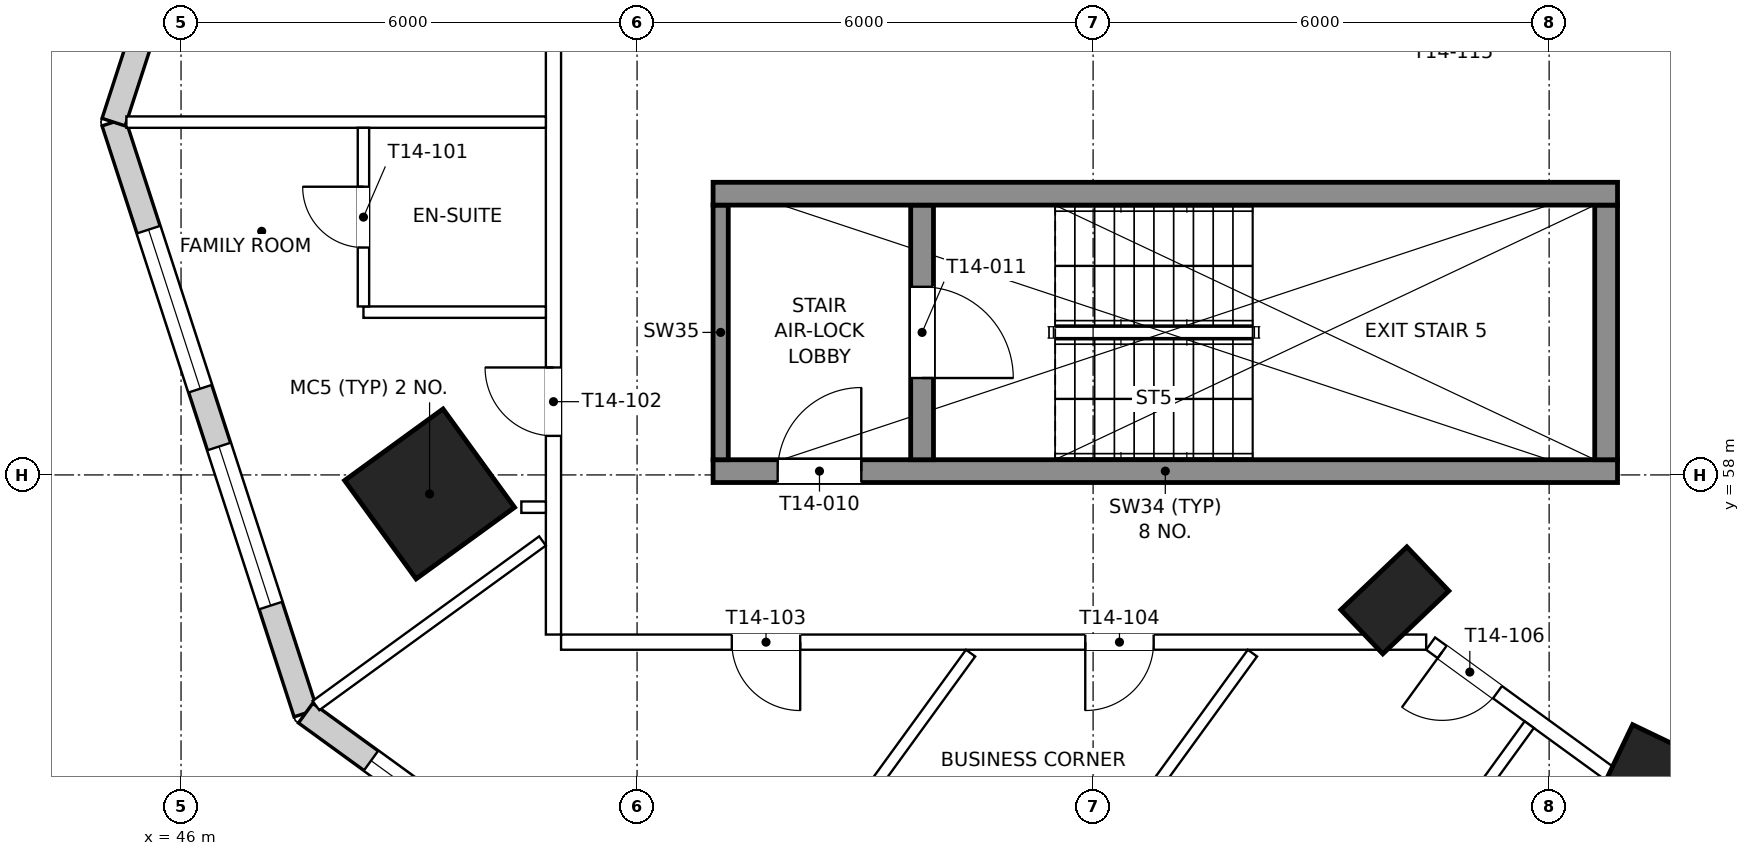
"""IFC4 building model, lengths in metres.
Left out: names, types, materials, properties, quantities, classifications, styles, units other than length and angle.
Written with IfcOpenShell. Run it as: python <this file> out.ifc"""

import sys

from ifc_helpers import new_model, si_unit, direction, frame, frame_2d, origin, origin_2d, place, context, subcontext, project, spatial, rectangle, extrude, element, fill, save


model = new_model("IFC4")
c1 = context("Model", 3, precision=1e-05, world=origin(), true_north=direction((0.0, 1.0)))
c2 = subcontext(c1, "Body", "Model", "MODEL_VIEW")
j1 = project(units=[si_unit("LENGTHUNIT", "METRE"), si_unit("PLANEANGLEUNIT", "RADIAN")], contexts=[c1])
p1 = place(None, origin())
s1 = spatial("IfcSite", under=j1, at=p1, CompositionType="ELEMENT")
p2 = place(p1, origin())
s2 = spatial("IfcBuilding", under=s1, at=p2, CompositionType="ELEMENT")
p3 = place(p2, frame((0.0, 0.0, 204.3)))
s3 = spatial("IfcBuildingStorey", under=s2, at=p3, CompositionType="ELEMENT", Elevation=204.3)
p4 = place(p3, frame((49.27, 57.75, 0.0), z_axis=(0.0, 0.0, 1.0), x_axis=(-0.809016994375, -0.587785252292, 0.0)))
e1 = element("IfcColumn", 1, at=p4, inside=s3, PredefinedType="COLUMN", context=c2, shape_type="SweptSolid", body=[
    extrude(rectangle(XDim=1.6, YDim=1.6, at=origin_2d()), origin(), (0.0, 0.0, 1.0), 3.9),
])
for number, where, z_axis, x_axis in (
    (2, (61.97, 56.35, 0.0), (0.0, 0.0, 1.0), (-0.69, 0.724, 0.0)),
    (3, (65.2, 54.0, 0.0), (0.0, 0.0, 1.0), (-0.902, 0.432, 0.0)),
):
    element("IfcColumn", number, at=place(p3, frame(where, z_axis=z_axis, x_axis=x_axis)), inside=s3, PredefinedType="COLUMN", context=c2, shape_type="SweptSolid", body=[
        extrude(rectangle(XDim=0.8, YDim=1.2, at=origin_2d()), origin(), (0.0, 0.0, 1.0), 3.9),
    ])
p5 = place(p3, frame((45.113, 62.642, 0.0), z_axis=(0.0, 0.0, 1.0), x_axis=(0.309006387978, -0.951059962457, 0.0)))
e4 = element("IfcWall", 4, at=p5, inside=s3, PredefinedType="SOLIDWALL", context=c2, shape_type="SweptSolid", body=[
    extrude(rectangle(XDim=8.175, YDim=0.32, at=frame_2d((4.087, 0.0))), origin(), (0.0, 0.0, 1.0), 3.6),
])
p6 = place(p5, frame((1.488, 0.0, 0.75)))
e5 = element("IfcOpeningElement", 5, at=p6, cuts=e4, PredefinedType="OPENING", context=c2, shape_type="SweptSolid", body=[
    extrude(rectangle(XDim=2.2, YDim=2.1, at=frame_2d((1.1, 1.05))), frame((0.0, 0.17, 0.0), z_axis=(0.0, -1.0, 0.0), x_axis=(1.0, 0.0, 0.0)), (0.0, 0.0, 1.0), 0.34),
])
p7 = place(p5, frame((4.488, 0.0, 0.75)))
e6 = element("IfcOpeningElement", 6, at=p7, cuts=e4, PredefinedType="OPENING", context=c2, shape_type="SweptSolid", body=[
    extrude(rectangle(XDim=2.2, YDim=2.1, at=frame_2d((1.1, 1.05))), frame((0.0, 0.17, 0.0), z_axis=(0.0, -1.0, 0.0), x_axis=(1.0, 0.0, 0.0)), (0.0, 0.0, 1.0), 0.34),
])
p8 = place(p3, frame((47.639, 54.867, 0.0), z_axis=(0.0, 0.0, 1.0), x_axis=(0.809017634756, -0.587784370883, 0.0)))
e7 = element("IfcWall", 7, at=p8, inside=s3, PredefinedType="SOLIDWALL", context=c2, shape_type="SweptSolid", body=[
    extrude(rectangle(XDim=22.229, YDim=0.32, at=frame_2d((11.114, 0.0))), origin(), (0.0, 0.0, 1.0), 3.6),
])
p9 = place(p8, frame((1.064, 0.0, 0.75)))
e8 = element("IfcOpeningElement", 8, at=p9, cuts=e7, PredefinedType="OPENING", context=c2, shape_type="SweptSolid", body=[
    extrude(rectangle(XDim=2.1, YDim=2.1, at=frame_2d((1.05, 1.05))), frame((0.0, 0.17, 0.0), z_axis=(0.0, -1.0, 0.0), x_axis=(1.0, 0.0, 0.0)), (0.0, 0.0, 1.0), 0.34),
])
p10 = place(p8, frame((4.064, 0.0, 0.75)))
e9 = element("IfcOpeningElement", 9, at=p10, cuts=e7, PredefinedType="OPENING", context=c2, shape_type="SweptSolid", body=[
    extrude(rectangle(XDim=2.1, YDim=2.1, at=frame_2d((1.05, 1.05))), frame((0.0, 0.17, 0.0), z_axis=(0.0, -1.0, 0.0), x_axis=(1.0, 0.0, 0.0)), (0.0, 0.0, 1.0), 0.34),
])
p11 = place(p8, frame((7.064, 0.0, 0.75)))
e10 = element("IfcOpeningElement", 10, at=p11, cuts=e7, PredefinedType="OPENING", context=c2, shape_type="SweptSolid", body=[
    extrude(rectangle(XDim=2.1, YDim=2.1, at=frame_2d((1.05, 1.05))), frame((0.0, 0.17, 0.0), z_axis=(0.0, -1.0, 0.0), x_axis=(1.0, 0.0, 0.0)), (0.0, 0.0, 1.0), 0.34),
])
p12 = place(p8, frame((10.064, 0.0, 0.75)))
e11 = element("IfcOpeningElement", 11, at=p12, cuts=e7, PredefinedType="OPENING", context=c2, shape_type="SweptSolid", body=[
    extrude(rectangle(XDim=2.1, YDim=2.1, at=frame_2d((1.05, 1.05))), frame((0.0, 0.17, 0.0), z_axis=(0.0, -1.0, 0.0), x_axis=(1.0, 0.0, 0.0)), (0.0, 0.0, 1.0), 0.34),
])
p13 = place(p8, frame((13.064, 0.0, 0.75)))
e12 = element("IfcOpeningElement", 12, at=p13, cuts=e7, PredefinedType="OPENING", context=c2, shape_type="SweptSolid", body=[
    extrude(rectangle(XDim=2.1, YDim=2.1, at=frame_2d((1.05, 1.05))), frame((0.0, 0.17, 0.0), z_axis=(0.0, -1.0, 0.0), x_axis=(1.0, 0.0, 0.0)), (0.0, 0.0, 1.0), 0.34),
])
p14 = place(p8, frame((16.064, 0.0, 0.75)))
e13 = element("IfcOpeningElement", 13, at=p14, cuts=e7, PredefinedType="OPENING", context=c2, shape_type="SweptSolid", body=[
    extrude(rectangle(XDim=2.1, YDim=2.1, at=frame_2d((1.05, 1.05))), frame((0.0, 0.17, 0.0), z_axis=(0.0, -1.0, 0.0), x_axis=(1.0, 0.0, 0.0)), (0.0, 0.0, 1.0), 0.34),
])
p15 = place(p8, frame((19.064, 0.0, 0.75)))
e14 = element("IfcOpeningElement", 14, at=p15, cuts=e7, PredefinedType="OPENING", context=c2, shape_type="SweptSolid", body=[
    extrude(rectangle(XDim=2.1, YDim=2.1, at=frame_2d((1.05, 1.05))), frame((0.0, 0.17, 0.0), z_axis=(0.0, -1.0, 0.0), x_axis=(1.0, 0.0, 0.0)), (0.0, 0.0, 1.0), 0.34),
])
p16 = place(p3, frame((51.658, 82.785, 0.0), z_axis=(0.0, 0.0, 1.0), x_axis=(-0.309019087741, -0.951055836117, 0.0)))
e15 = element("IfcWall", 15, at=p16, inside=s3, PredefinedType="SOLIDWALL", context=c2, shape_type="SweptSolid", body=[
    extrude(rectangle(XDim=21.18, YDim=0.32, at=frame_2d((10.59, 0.0))), origin(), (0.0, 0.0, 1.0), 3.6),
])
p17 = place(p16, frame((2.04, 0.0, 0.75)))
e16 = element("IfcOpeningElement", 16, at=p17, cuts=e15, PredefinedType="OPENING", context=c2, shape_type="SweptSolid", body=[
    extrude(rectangle(XDim=2.1, YDim=2.1, at=frame_2d((1.05, 1.05))), frame((0.0, 0.17, 0.0), z_axis=(0.0, -1.0, 0.0), x_axis=(1.0, 0.0, 0.0)), (0.0, 0.0, 1.0), 0.34),
])
p18 = place(p16, frame((5.453, 0.0, 0.9)))
e17 = element("IfcOpeningElement", 17, at=p18, cuts=e15, PredefinedType="OPENING", context=c2, shape_type="SweptSolid", body=[
    extrude(rectangle(XDim=1.6, YDim=1.8, at=frame_2d((0.8, 0.9))), frame((0.0, 0.17, 0.0), z_axis=(0.0, -1.0, 0.0), x_axis=(1.0, 0.0, 0.0)), (0.0, 0.0, 1.0), 0.34),
])
p19 = place(p16, frame((8.04, 0.0, 0.75)))
e18 = element("IfcOpeningElement", 18, at=p19, cuts=e15, PredefinedType="OPENING", context=c2, shape_type="SweptSolid", body=[
    extrude(rectangle(XDim=2.1, YDim=2.1, at=frame_2d((1.05, 1.05))), frame((0.0, 0.17, 0.0), z_axis=(0.0, -1.0, 0.0), x_axis=(1.0, 0.0, 0.0)), (0.0, 0.0, 1.0), 0.34),
])
p20 = place(p16, frame((11.04, 0.0, 0.75)))
e19 = element("IfcOpeningElement", 19, at=p20, cuts=e15, PredefinedType="OPENING", context=c2, shape_type="SweptSolid", body=[
    extrude(rectangle(XDim=2.1, YDim=2.1, at=frame_2d((1.05, 1.05))), frame((0.0, 0.17, 0.0), z_axis=(0.0, -1.0, 0.0), x_axis=(1.0, 0.0, 0.0)), (0.0, 0.0, 1.0), 0.34),
])
p21 = place(p16, frame((13.908, 0.0, 0.75)))
e20 = element("IfcOpeningElement", 20, at=p21, cuts=e15, PredefinedType="OPENING", context=c2, shape_type="SweptSolid", body=[
    extrude(rectangle(XDim=2.1, YDim=2.1, at=frame_2d((1.05, 1.05))), frame((0.0, 0.17, 0.0), z_axis=(0.0, -1.0, 0.0), x_axis=(1.0, 0.0, 0.0)), (0.0, 0.0, 1.0), 0.34),
])
p22 = place(p16, frame((17.04, 0.0, 0.75)))
e21 = element("IfcOpeningElement", 21, at=p22, cuts=e15, PredefinedType="OPENING", context=c2, shape_type="SweptSolid", body=[
    extrude(rectangle(XDim=2.1, YDim=2.1, at=frame_2d((1.05, 1.05))), frame((0.0, 0.17, 0.0), z_axis=(0.0, -1.0, 0.0), x_axis=(1.0, 0.0, 0.0)), (0.0, 0.0, 1.0), 0.34),
])
p23 = place(p3, frame((53.0, 58.05, 0.0), z_axis=(0.0, 0.0, 1.0), x_axis=(1.0, 0.0, 0.0)))
e22 = element("IfcWall", 22, at=p23, inside=s3, PredefinedType="SHEAR", context=c2, shape_type="SweptSolid", body=[
    extrude(rectangle(XDim=11.9, YDim=0.3, at=frame_2d((5.95, 0.0))), origin(), (0.0, 0.0, 1.0), 3.9),
])
p24 = place(p23, frame((0.85, 0.0, 0.0)))
e23 = element("IfcOpeningElement", 23, at=p24, cuts=e22, PredefinedType="OPENING", context=c2, shape_type="SweptSolid", body=[
    extrude(rectangle(XDim=1.1, YDim=2.1, at=frame_2d((0.55, 1.05))), frame((0.0, 0.16, 0.0), z_axis=(0.0, -1.0, 0.0), x_axis=(1.0, 0.0, 0.0)), (0.0, 0.0, 1.0), 0.32),
])
p25 = place(p3, frame((53.1, 58.2, 0.0), z_axis=(0.0, 0.0, 1.0), x_axis=(0.0, 1.0, 0.0)))
e24 = element("IfcWall", 24, at=p25, inside=s3, PredefinedType="SHEAR", context=c2, shape_type="SweptSolid", body=[
    extrude(rectangle(XDim=3.35, YDim=0.2, at=frame_2d((1.675, 0.0))), origin(), (0.0, 0.0, 1.0), 3.9),
])
p26 = place(p3, frame((55.75, 58.2, 0.0), z_axis=(0.0, 0.0, 1.0), x_axis=(0.0, 1.0, 0.0)))
e25 = element("IfcWall", 25, at=p26, inside=s3, PredefinedType="SHEAR", context=c2, shape_type="SweptSolid", body=[
    extrude(rectangle(XDim=3.35, YDim=0.3, at=frame_2d((1.675, 0.0))), origin(), (0.0, 0.0, 1.0), 3.9),
])
p27 = place(p26, frame((1.075, 0.0, 0.0)))
e26 = element("IfcOpeningElement", 26, at=p27, cuts=e25, PredefinedType="OPENING", context=c2, shape_type="SweptSolid", body=[
    extrude(rectangle(XDim=1.2, YDim=2.1, at=frame_2d((0.6, 1.05))), frame((0.0, 0.16, 0.0), z_axis=(0.0, -1.0, 0.0), x_axis=(1.0, 0.0, 0.0)), (0.0, 0.0, 1.0), 0.32),
])
p28 = place(p3, frame((64.75, 58.2, 0.0), z_axis=(0.0, 0.0, 1.0), x_axis=(0.0, 1.0, 0.0)))
e27 = element("IfcWall", 27, at=p28, inside=s3, PredefinedType="SHEAR", context=c2, shape_type="SweptSolid", body=[
    extrude(rectangle(XDim=3.35, YDim=0.3, at=frame_2d((1.675, 0.0))), origin(), (0.0, 0.0, 1.0), 3.9),
])
p29 = place(p3, frame((53.0, 61.7, 0.0), z_axis=(0.0, 0.0, 1.0), x_axis=(1.0, 0.0, 0.0)))
e28 = element("IfcWall", 28, at=p29, inside=s3, PredefinedType="SHEAR", context=c2, shape_type="SweptSolid", body=[
    extrude(rectangle(XDim=11.9, YDim=0.3, at=frame_2d((5.95, 0.0))), origin(), (0.0, 0.0, 1.0), 3.9),
])
p30 = place(p3, frame((68.663, 51.26, 0.0), z_axis=(0.0, 0.0, 1.0), x_axis=(-0.80901190539, 0.587792256616, 0.0)))
e29 = element("IfcWall", 29, at=p30, inside=s3, PredefinedType="PARTITIONING", context=c2, shape_type="SweptSolid", body=[
    extrude(rectangle(XDim=7.691, YDim=0.2, at=frame_2d((3.846, 0.0))), origin(), (0.0, 0.0, 1.0), 3.05),
])
p31 = place(p30, frame((6.604, 0.0, 0.0)))
e30 = element("IfcOpeningElement", 30, at=p31, cuts=e29, PredefinedType="OPENING", context=c2, shape_type="SweptSolid", body=[
    extrude(rectangle(XDim=0.9, YDim=2.1, at=frame_2d((0.45, 1.05))), frame((0.0, 0.11, 0.0), z_axis=(0.0, -1.0, 0.0), x_axis=(1.0, 0.0, 0.0)), (0.0, 0.0, 1.0), 0.22),
])
p32 = place(p30, frame((1.291, 0.0, 0.0)))
e31 = element("IfcOpeningElement", 31, at=p32, cuts=e29, PredefinedType="OPENING", context=c2, shape_type="SweptSolid", body=[
    extrude(rectangle(XDim=0.9, YDim=2.1, at=frame_2d((0.45, 1.05))), frame((0.0, 0.11, 0.0), z_axis=(0.0, -1.0, 0.0), x_axis=(1.0, 0.0, 0.0)), (0.0, 0.0, 1.0), 0.22),
])
p33 = place(p3, frame((62.382, 55.8, 0.0), z_axis=(0.0, 0.0, 1.0), x_axis=(-1.0, 0.0, 0.0)))
e32 = element("IfcWall", 32, at=p33, inside=s3, PredefinedType="PARTITIONING", context=c2, shape_type="SweptSolid", body=[
    extrude(rectangle(XDim=11.382, YDim=0.2, at=frame_2d((5.691, 0.0))), origin(), (0.0, 0.0, 1.0), 3.15),
])
p34 = place(p33, frame((8.236, 0.0, 0.0)))
e33 = element("IfcOpeningElement", 33, at=p34, cuts=e32, PredefinedType="OPENING", context=c2, shape_type="SweptSolid", body=[
    extrude(rectangle(XDim=0.9, YDim=2.1, at=frame_2d((0.45, 1.05))), frame((0.0, 0.11, 0.0), z_axis=(0.0, -1.0, 0.0), x_axis=(1.0, 0.0, 0.0)), (0.0, 0.0, 1.0), 0.22),
])
p35 = place(p33, frame((3.585, 0.0, 0.0)))
e34 = element("IfcOpeningElement", 34, at=p35, cuts=e32, PredefinedType="OPENING", context=c2, shape_type="SweptSolid", body=[
    extrude(rectangle(XDim=0.9, YDim=2.1, at=frame_2d((0.45, 1.05))), frame((0.0, 0.11, 0.0), z_axis=(0.0, -1.0, 0.0), x_axis=(1.0, 0.0, 0.0)), (0.0, 0.0, 1.0), 0.22),
])
p36 = place(p3, frame((50.9, 55.9, 0.0), z_axis=(0.0, 0.0, 1.0), x_axis=(0.0, 1.0, 0.0)))
e35 = element("IfcWall", 35, at=p36, inside=s3, PredefinedType="PARTITIONING", context=c2, shape_type="SweptSolid", body=[
    extrude(rectangle(XDim=7.95, YDim=0.2, at=frame_2d((3.975, 0.0))), origin(), (0.0, 0.0, 1.0), 3.15),
])
p37 = place(p36, frame((2.614, 0.0, 0.0)))
e36 = element("IfcOpeningElement", 36, at=p37, cuts=e35, PredefinedType="OPENING", context=c2, shape_type="SweptSolid", body=[
    extrude(rectangle(XDim=0.9, YDim=2.1, at=frame_2d((0.45, 1.05))), frame((0.0, 0.11, 0.0), z_axis=(0.0, -1.0, 0.0), x_axis=(1.0, 0.0, 0.0)), (0.0, 0.0, 1.0), 0.22),
])
p38 = place(p3, frame((45.281, 62.642, 0.0), z_axis=(0.0, 0.0, 1.0), x_axis=(1.0, 0.0, 0.0)))
e37 = element("IfcWall", 37, at=p38, inside=s3, PredefinedType="PARTITIONING", context=c2, shape_type="SweptSolid", body=[
    extrude(rectangle(XDim=5.519, YDim=0.15, at=frame_2d((2.76, 0.0))), origin(), (0.0, 0.0, 1.0), 3.15),
])
p39 = place(p3, frame((47.775, 54.966, 0.0), z_axis=(0.0, 0.0, 1.0), x_axis=(0.809028266422, 0.587769737338, 0.0)))
e38 = element("IfcWall", 38, at=p39, inside=s3, PredefinedType="PARTITIONING", context=c2, shape_type="SweptSolid", body=[
    extrude(rectangle(XDim=3.684, YDim=0.15, at=frame_2d((1.842, 0.0))), origin(), (0.0, 0.0, 1.0), 3.15),
])
p40 = place(p3, frame((50.8, 60.142, 0.0), z_axis=(0.0, 0.0, 1.0), x_axis=(-1.0, 0.0, 0.0)))
e39 = element("IfcWall", 39, at=p40, inside=s3, PredefinedType="PARTITIONING", context=c2, shape_type="SweptSolid", body=[
    extrude(rectangle(XDim=2.4, YDim=0.15, at=frame_2d((1.2, 0.0))), origin(), (0.0, 0.0, 1.0), 3.15),
])
p41 = place(p3, frame((48.4, 62.567, 0.0), z_axis=(0.0, 0.0, 1.0), x_axis=(0.0, -1.0, 0.0)))
e40 = element("IfcWall", 40, at=p41, inside=s3, PredefinedType="PARTITIONING", context=c2, shape_type="SweptSolid", body=[
    extrude(rectangle(XDim=2.35, YDim=0.15, at=frame_2d((1.175, 0.0))), origin(), (0.0, 0.0, 1.0), 3.15),
])
p42 = place(p41, frame((0.775, 0.0, 0.0)))
e41 = element("IfcOpeningElement", 41, at=p42, cuts=e40, PredefinedType="OPENING", context=c2, shape_type="SweptSolid", body=[
    extrude(rectangle(XDim=0.8, YDim=2.1, at=frame_2d((0.4, 1.05))), frame((0.0, 0.085, 0.0), z_axis=(0.0, -1.0, 0.0), x_axis=(1.0, 0.0, 0.0)), (0.0, 0.0, 1.0), 0.17),
])
p43 = place(p3, frame((53.084, 51.108, 0.0), z_axis=(0.0, 0.0, 1.0), x_axis=(0.587804932614, 0.809002695419, 0.0)))
e42 = element("IfcWall", 42, at=p43, inside=s3, PredefinedType="PARTITIONING", context=c2, shape_type="SweptSolid", body=[
    extrude(rectangle(XDim=5.621, YDim=0.15, at=frame_2d((2.811, 0.0))), origin(), (0.0, 0.0, 1.0), 3.15),
])
p44 = place(p3, frame((55.511, 49.345, 0.0), z_axis=(0.0, 0.0, 1.0), x_axis=(0.587782705134, 0.809018844988, 0.0)))
e43 = element("IfcWall", 43, at=p44, inside=s3, PredefinedType="PARTITIONING", context=c2, shape_type="SweptSolid", body=[
    extrude(rectangle(XDim=7.801, YDim=0.15, at=frame_2d((3.9, 0.0))), origin(), (0.0, 0.0, 1.0), 3.15),
])
p45 = place(p3, frame((63.739, 54.715, 0.0), z_axis=(0.0, 0.0, 1.0), x_axis=(-0.587772420479, -0.809026317077, 0.0)))
e44 = element("IfcWall", 44, at=p45, inside=s3, PredefinedType="PARTITIONING", context=c2, shape_type="SweptSolid", body=[
    extrude(rectangle(XDim=2.4, YDim=0.15, at=frame_2d((1.2, 0.0))), origin(), (0.0, 0.0, 1.0), 3.6),
])
p46 = place(p3, frame((50.477, 57.576, 0.0), z_axis=(0.0, 0.0, 1.0), x_axis=(1.0, 0.0, 0.0)))
e45 = element("IfcWall", 45, at=p46, inside=s3, PredefinedType="PARTITIONING", context=c2, shape_type="SweptSolid", body=[
    extrude(rectangle(XDim=0.323, YDim=0.15, at=frame_2d((0.161, 0.0))), origin(), (0.0, 0.0, 1.0), 3.6),
])
p47 = place(p6, origin())
e46 = element("IfcWindow", 46, at=p47, inside=s3, PartitioningType="SINGLE_PANEL", PredefinedType="WINDOW", context=c2, shape_type="SweptSolid", body=[
    extrude(rectangle(XDim=2.2, YDim=2.1, at=frame_2d((1.1, 1.05))), frame((0.0, 0.07, 0.0), z_axis=(0.0, -1.0, 0.0), x_axis=(1.0, 0.0, 0.0)), (0.0, 0.0, 1.0), 0.06),
])
fill(e5, e46)
p48 = place(p7, origin())
e47 = element("IfcWindow", 47, at=p48, inside=s3, PartitioningType="SINGLE_PANEL", PredefinedType="WINDOW", context=c2, shape_type="SweptSolid", body=[
    extrude(rectangle(XDim=2.2, YDim=2.1, at=frame_2d((1.1, 1.05))), frame((0.0, 0.07, 0.0), z_axis=(0.0, -1.0, 0.0), x_axis=(1.0, 0.0, 0.0)), (0.0, 0.0, 1.0), 0.06),
])
fill(e6, e47)
p49 = place(p9, origin())
e48 = element("IfcWindow", 48, at=p49, inside=s3, PartitioningType="SINGLE_PANEL", PredefinedType="WINDOW", context=c2, shape_type="SweptSolid", body=[
    extrude(rectangle(XDim=2.1, YDim=2.1, at=frame_2d((1.05, 1.05))), frame((0.0, 0.07, 0.0), z_axis=(0.0, -1.0, 0.0), x_axis=(1.0, 0.0, 0.0)), (0.0, 0.0, 1.0), 0.06),
])
fill(e8, e48)
p50 = place(p24, origin())
e49 = element("IfcDoor", 49, at=p50, inside=s3, OperationType="SINGLE_SWING_RIGHT", PredefinedType="DOOR", context=c2, shape_type="SweptSolid", body=[
    extrude(rectangle(XDim=1.1, YDim=2.1, at=frame_2d((0.55, 1.05))), frame((0.0, 0.025, 0.0), z_axis=(0.0, -1.0, 0.0), x_axis=(1.0, 0.0, 0.0)), (0.0, 0.0, 1.0), 0.05),
])
fill(e23, e49)
p51 = place(p27, frame((1.2, 0.0, 0.0), z_axis=(0.0, 0.0, 1.0), x_axis=(-1.0, 0.0, 0.0)))
e50 = element("IfcDoor", 50, at=p51, inside=s3, OperationType="SINGLE_SWING_RIGHT", PredefinedType="DOOR", context=c2, shape_type="SweptSolid", body=[
    extrude(rectangle(XDim=1.2, YDim=2.1, at=frame_2d((0.6, 1.05))), frame((0.0, 0.025, 0.0), z_axis=(0.0, -1.0, 0.0), x_axis=(1.0, 0.0, 0.0)), (0.0, 0.0, 1.0), 0.05),
])
fill(e26, e50)
p52 = place(p42, frame((0.8, 0.0, 0.0), z_axis=(0.0, 0.0, 1.0), x_axis=(-1.0, 0.0, 0.0)))
e51 = element("IfcDoor", 51, at=p52, inside=s3, OperationType="SINGLE_SWING_RIGHT", PredefinedType="DOOR", context=c2, shape_type="SweptSolid", body=[
    extrude(rectangle(XDim=0.8, YDim=2.1, at=frame_2d((0.4, 1.05))), frame((0.0, 0.025, 0.0), z_axis=(0.0, -1.0, 0.0), x_axis=(1.0, 0.0, 0.0)), (0.0, 0.0, 1.0), 0.05),
])
fill(e41, e51)
p53 = place(p37, origin())
e52 = element("IfcDoor", 52, at=p53, inside=s3, OperationType="SINGLE_SWING_RIGHT", PredefinedType="DOOR", context=c2, shape_type="SweptSolid", body=[
    extrude(rectangle(XDim=0.9, YDim=2.1, at=frame_2d((0.45, 1.05))), frame((0.0, 0.025, 0.0), z_axis=(0.0, -1.0, 0.0), x_axis=(1.0, 0.0, 0.0)), (0.0, 0.0, 1.0), 0.05),
])
fill(e36, e52)
p54 = place(p34, origin())
e53 = element("IfcDoor", 53, at=p54, inside=s3, OperationType="SINGLE_SWING_LEFT", PredefinedType="DOOR", context=c2, shape_type="SweptSolid", body=[
    extrude(rectangle(XDim=0.9, YDim=2.1, at=frame_2d((0.45, 1.05))), frame((0.0, 0.025, 0.0), z_axis=(0.0, -1.0, 0.0), x_axis=(1.0, 0.0, 0.0)), (0.0, 0.0, 1.0), 0.05),
])
fill(e33, e53)
p55 = place(p35, origin())
e54 = element("IfcDoor", 54, at=p55, inside=s3, OperationType="SINGLE_SWING_RIGHT", PredefinedType="DOOR", context=c2, shape_type="SweptSolid", body=[
    extrude(rectangle(XDim=0.9, YDim=2.1, at=frame_2d((0.45, 1.05))), frame((0.0, 0.025, 0.0), z_axis=(0.0, -1.0, 0.0), x_axis=(1.0, 0.0, 0.0)), (0.0, 0.0, 1.0), 0.05),
])
fill(e34, e54)
p56 = place(p31, origin())
e55 = element("IfcDoor", 55, at=p56, inside=s3, OperationType="SINGLE_SWING_RIGHT", PredefinedType="DOOR", context=c2, shape_type="SweptSolid", body=[
    extrude(rectangle(XDim=0.9, YDim=2.1, at=frame_2d((0.45, 1.05))), frame((0.0, 0.025, 0.0), z_axis=(0.0, -1.0, 0.0), x_axis=(1.0, 0.0, 0.0)), (0.0, 0.0, 1.0), 0.05),
])
fill(e30, e55)
save(model, sys.argv[1])
